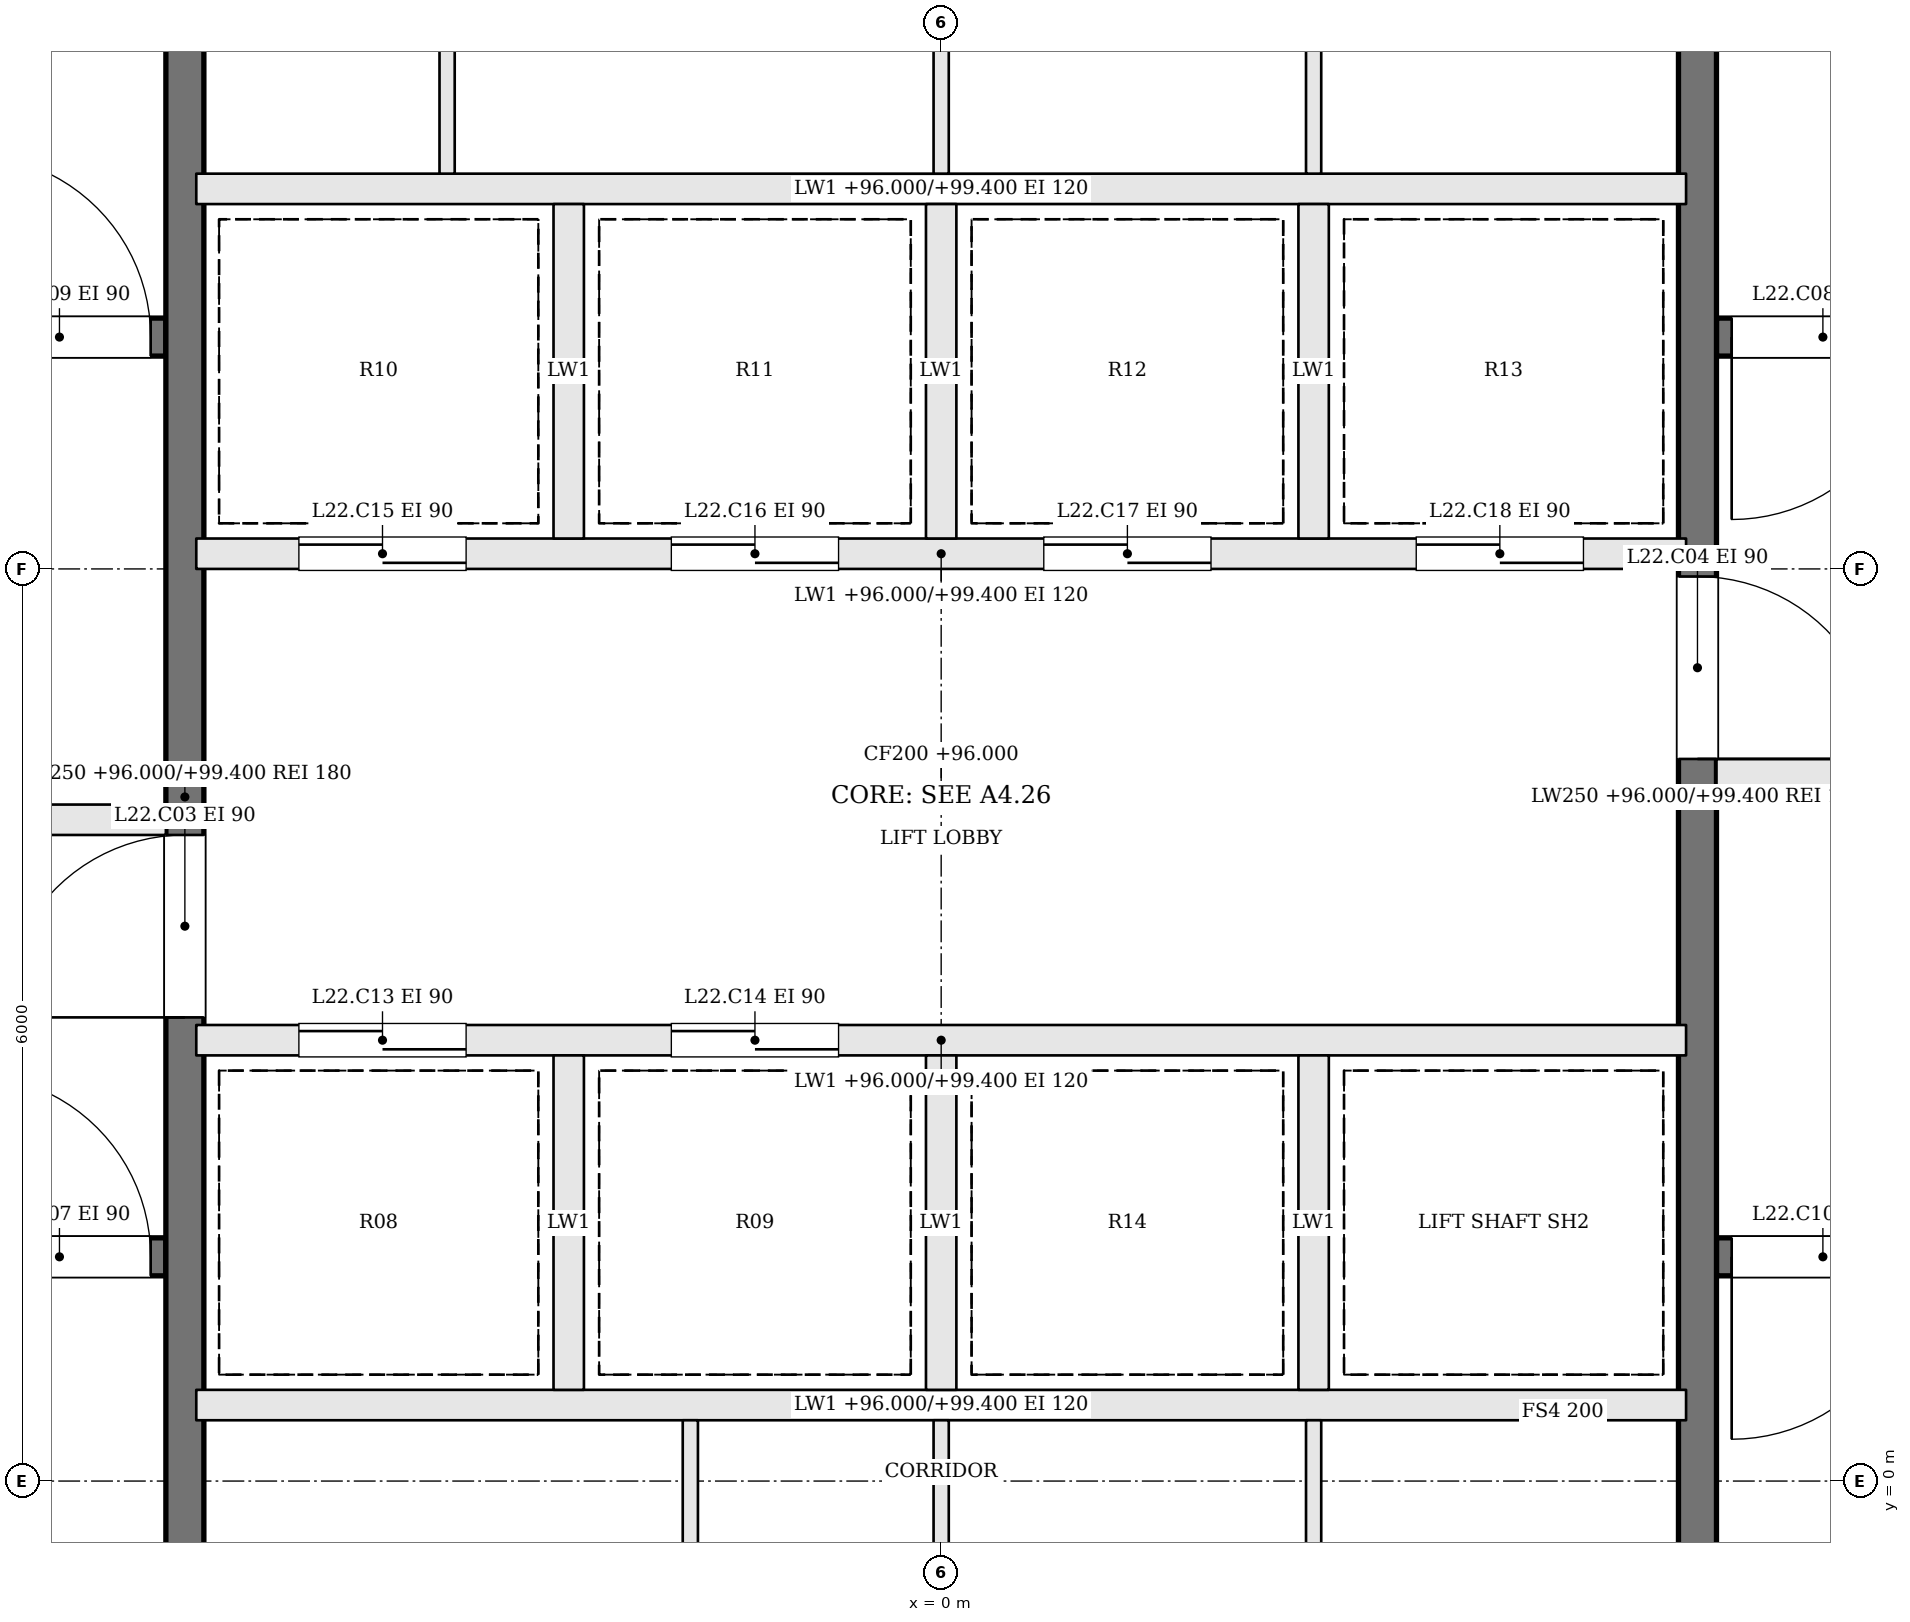
"""IFC4 building model, lengths in metres.
Left out: names, types, materials, properties, quantities, classifications, styles, units other than length and angle.
Written with IfcOpenShell. Run it as: python <this file> out.ifc"""

import sys

from ifc_helpers import new_model, si_unit, direction, frame, frame_2d, origin, place, context, subcontext, project, spatial, rectangle, extrude, element, fill, save


model = new_model("IFC4")
c1 = context("Model", 3, precision=1e-05, world=origin(), true_north=direction((0.0, 1.0)))
c2 = subcontext(c1, "Body", "Model", "MODEL_VIEW")
j1 = project(units=[si_unit("LENGTHUNIT", "METRE"), si_unit("PLANEANGLEUNIT", "RADIAN")], contexts=[c1])
p1 = place(None, origin())
s1 = spatial("IfcSite", under=j1, at=p1, CompositionType="ELEMENT")
p2 = place(p1, origin())
s2 = spatial("IfcBuilding", under=s1, at=p2, CompositionType="ELEMENT")
p3 = place(p2, frame((0.0, 0.0, 96.0)))
s3 = spatial("IfcBuildingStorey", under=s2, at=p3, CompositionType="ELEMENT", Elevation=96.0)
p4 = place(p3, frame((-11.9, 1.475, 0.0), z_axis=(0.0, 0.0, 1.0), x_axis=(1.0, 0.0, 0.0)))
e1 = element("IfcWall", 1, at=p4, inside=s3, PredefinedType="SOLIDWALL", context=c2, shape_type="SweptSolid", body=[
    extrude(rectangle(XDim=6.8, YDim=0.25, at=frame_2d((3.4, 0.0))), origin(), (0.0, 0.0, 1.0), 3.4),
])
p5 = place(p4, frame((5.5, 0.0, 0.0)))
e2 = element("IfcOpeningElement", 2, at=p5, cuts=e1, PredefinedType="OPENING", context=c2, shape_type="SweptSolid", body=[
    extrude(rectangle(XDim=1.2, YDim=2.1, at=frame_2d((0.6, 1.05))), frame((0.0, 0.135, 0.0), z_axis=(0.0, -1.0, 0.0), x_axis=(1.0, 0.0, 0.0)), (0.0, 0.0, 1.0), 0.27),
])
p6 = place(p3, frame((11.9, 7.525, 0.0), z_axis=(0.0, 0.0, 1.0), x_axis=(-1.0, 0.0, 0.0)))
e3 = element("IfcWall", 3, at=p6, inside=s3, PredefinedType="SOLIDWALL", context=c2, shape_type="SweptSolid", body=[
    extrude(rectangle(XDim=6.8, YDim=0.25, at=frame_2d((3.4, 0.0))), origin(), (0.0, 0.0, 1.0), 3.4),
])
p7 = place(p6, frame((5.5, 0.0, 0.0)))
e4 = element("IfcOpeningElement", 4, at=p7, cuts=e3, PredefinedType="OPENING", context=c2, shape_type="SweptSolid", body=[
    extrude(rectangle(XDim=1.2, YDim=2.1, at=frame_2d((0.6, 1.05))), frame((0.0, 0.135, 0.0), z_axis=(0.0, -1.0, 0.0), x_axis=(1.0, 0.0, 0.0)), (0.0, 0.0, 1.0), 0.27),
])
p8 = place(p3, frame((-11.9, 4.35, 0.0), z_axis=(0.0, 0.0, 1.0), x_axis=(1.0, 0.0, 0.0)))
e5 = element("IfcWall", 5, at=p8, inside=s3, PredefinedType="SOLIDWALL", context=c2, shape_type="SweptSolid", body=[
    extrude(rectangle(XDim=6.8, YDim=0.2, at=frame_2d((3.4, 0.0))), origin(), (0.0, 0.0, 1.0), 3.4),
])
p9 = place(p8, frame((4.1, 0.0, 0.0)))
e6 = element("IfcOpeningElement", 6, at=p9, cuts=e5, PredefinedType="OPENING", context=c2, shape_type="SweptSolid", body=[
    extrude(rectangle(XDim=1.2, YDim=2.1, at=frame_2d((0.6, 1.05))), frame((0.0, 0.11, 0.0), z_axis=(0.0, -1.0, 0.0), x_axis=(1.0, 0.0, 0.0)), (0.0, 0.0, 1.0), 0.22),
])
p10 = place(p8, frame((0.8, 0.0, 0.0)))
e7 = element("IfcOpeningElement", 7, at=p10, cuts=e5, PredefinedType="OPENING", context=c2, shape_type="SweptSolid", body=[
    extrude(rectangle(XDim=1.2, YDim=2.1, at=frame_2d((0.6, 1.05))), frame((0.0, 0.11, 0.0), z_axis=(0.0, -1.0, 0.0), x_axis=(1.0, 0.0, 0.0)), (0.0, 0.0, 1.0), 0.22),
])
p11 = place(p3, frame((11.9, 4.65, 0.0), z_axis=(0.0, 0.0, 1.0), x_axis=(-1.0, 0.0, 0.0)))
e8 = element("IfcWall", 8, at=p11, inside=s3, PredefinedType="SOLIDWALL", context=c2, shape_type="SweptSolid", body=[
    extrude(rectangle(XDim=6.8, YDim=0.2, at=frame_2d((3.4, 0.0))), origin(), (0.0, 0.0, 1.0), 3.4),
])
p12 = place(p11, frame((4.1, 0.0, 0.0)))
e9 = element("IfcOpeningElement", 9, at=p12, cuts=e8, PredefinedType="OPENING", context=c2, shape_type="SweptSolid", body=[
    extrude(rectangle(XDim=1.2, YDim=2.1, at=frame_2d((0.6, 1.05))), frame((0.0, 0.11, 0.0), z_axis=(0.0, -1.0, 0.0), x_axis=(1.0, 0.0, 0.0)), (0.0, 0.0, 1.0), 0.22),
])
p13 = place(p11, frame((0.8, 0.0, 0.0)))
e10 = element("IfcOpeningElement", 10, at=p13, cuts=e8, PredefinedType="OPENING", context=c2, shape_type="SweptSolid", body=[
    extrude(rectangle(XDim=1.2, YDim=2.1, at=frame_2d((0.6, 1.05))), frame((0.0, 0.11, 0.0), z_axis=(0.0, -1.0, 0.0), x_axis=(1.0, 0.0, 0.0)), (0.0, 0.0, 1.0), 0.22),
])
p14 = place(p3, frame((-11.9, 7.525, 0.0), z_axis=(0.0, 0.0, 1.0), x_axis=(1.0, 0.0, 0.0)))
e11 = element("IfcWall", 11, at=p14, inside=s3, PredefinedType="SOLIDWALL", context=c2, shape_type="SweptSolid", body=[
    extrude(rectangle(XDim=6.8, YDim=0.25, at=frame_2d((3.4, 0.0))), origin(), (0.0, 0.0, 1.0), 3.4),
])
p15 = place(p14, frame((5.5, 0.0, 0.0)))
e12 = element("IfcOpeningElement", 12, at=p15, cuts=e11, PredefinedType="OPENING", context=c2, shape_type="SweptSolid", body=[
    extrude(rectangle(XDim=1.2, YDim=2.1, at=frame_2d((0.6, 1.05))), frame((0.0, 0.135, 0.0), z_axis=(0.0, -1.0, 0.0), x_axis=(1.0, 0.0, 0.0)), (0.0, 0.0, 1.0), 0.27),
])
p16 = place(p3, frame((11.9, 1.475, 0.0), z_axis=(0.0, 0.0, 1.0), x_axis=(-1.0, 0.0, 0.0)))
e13 = element("IfcWall", 13, at=p16, inside=s3, PredefinedType="SOLIDWALL", context=c2, shape_type="SweptSolid", body=[
    extrude(rectangle(XDim=6.8, YDim=0.25, at=frame_2d((3.4, 0.0))), origin(), (0.0, 0.0, 1.0), 3.4),
])
p17 = place(p16, frame((5.5, 0.0, 0.0)))
e14 = element("IfcOpeningElement", 14, at=p17, cuts=e13, PredefinedType="OPENING", context=c2, shape_type="SweptSolid", body=[
    extrude(rectangle(XDim=1.2, YDim=2.1, at=frame_2d((0.6, 1.05))), frame((0.0, 0.135, 0.0), z_axis=(0.0, -1.0, 0.0), x_axis=(1.0, 0.0, 0.0)), (0.0, 0.0, 1.0), 0.27),
])
p18 = place(p3, frame((-4.975, -1.9, 0.0), z_axis=(0.0, 0.0, 1.0), x_axis=(0.0, 1.0, 0.0)))
e15 = element("IfcWall", 15, at=p18, inside=s3, PredefinedType="SOLIDWALL", context=c2, shape_type="SweptSolid", body=[
    extrude(rectangle(XDim=12.8, YDim=0.25, at=frame_2d((6.4, 0.0))), origin(), (0.0, 0.0, 1.0), 3.4),
])
p19 = place(p18, frame((4.95, 0.0, 0.0)))
e16 = element("IfcOpeningElement", 16, at=p19, cuts=e15, PredefinedType="OPENING", context=c2, shape_type="SweptSolid", body=[
    extrude(rectangle(XDim=1.2, YDim=2.1, at=frame_2d((0.6, 1.05))), frame((0.0, 0.135, 0.0), z_axis=(0.0, -1.0, 0.0), x_axis=(1.0, 0.0, 0.0)), (0.0, 0.0, 1.0), 0.27),
])
p20 = place(p3, frame((4.975, 10.9, 0.0), z_axis=(0.0, 0.0, 1.0), x_axis=(0.0, -1.0, 0.0)))
e17 = element("IfcWall", 17, at=p20, inside=s3, PredefinedType="SOLIDWALL", context=c2, shape_type="SweptSolid", body=[
    extrude(rectangle(XDim=12.8, YDim=0.25, at=frame_2d((6.4, 0.0))), origin(), (0.0, 0.0, 1.0), 3.4),
])
p21 = place(p20, frame((4.95, 0.0, 0.0)))
e18 = element("IfcOpeningElement", 18, at=p21, cuts=e17, PredefinedType="OPENING", context=c2, shape_type="SweptSolid", body=[
    extrude(rectangle(XDim=1.2, YDim=2.1, at=frame_2d((0.6, 1.05))), frame((0.0, 0.135, 0.0), z_axis=(0.0, -1.0, 0.0), x_axis=(1.0, 0.0, 0.0)), (0.0, 0.0, 1.0), 0.27),
])
p22 = place(p3, frame((-4.9, 0.5, 0.0), z_axis=(0.0, 0.0, 1.0), x_axis=(1.0, 0.0, 0.0)))
e19 = element("IfcWall", 19, at=p22, inside=s3, PredefinedType="SOLIDWALL", context=c2, shape_type="SweptSolid", body=[
    extrude(rectangle(XDim=9.8, YDim=0.2, at=frame_2d((4.9, 0.0))), origin(), (0.0, 0.0, 1.0), 3.4),
])
p23 = place(p3, frame((-4.9, 2.9, 0.0), z_axis=(0.0, 0.0, 1.0), x_axis=(1.0, 0.0, 0.0)))
e20 = element("IfcWall", 20, at=p23, inside=s3, PredefinedType="SOLIDWALL", context=c2, shape_type="SweptSolid", body=[
    extrude(rectangle(XDim=9.8, YDim=0.2, at=frame_2d((4.9, 0.0))), origin(), (0.0, 0.0, 1.0), 3.4),
])
p24 = place(p23, frame((0.675, 0.0, 0.0)))
e21 = element("IfcOpeningElement", 21, at=p24, cuts=e20, PredefinedType="OPENING", context=c2, shape_type="SweptSolid", body=[
    extrude(rectangle(XDim=1.1, YDim=2.1, at=frame_2d((0.55, 1.05))), frame((0.0, 0.11, 0.0), z_axis=(0.0, -1.0, 0.0), x_axis=(1.0, 0.0, 0.0)), (0.0, 0.0, 1.0), 0.22),
])
p25 = place(p23, frame((3.125, 0.0, 0.0)))
e22 = element("IfcOpeningElement", 22, at=p25, cuts=e20, PredefinedType="OPENING", context=c2, shape_type="SweptSolid", body=[
    extrude(rectangle(XDim=1.1, YDim=2.1, at=frame_2d((0.55, 1.05))), frame((0.0, 0.11, 0.0), z_axis=(0.0, -1.0, 0.0), x_axis=(1.0, 0.0, 0.0)), (0.0, 0.0, 1.0), 0.22),
])
p26 = place(p3, frame((-4.9, 6.1, 0.0), z_axis=(0.0, 0.0, 1.0), x_axis=(1.0, 0.0, 0.0)))
e23 = element("IfcWall", 23, at=p26, inside=s3, PredefinedType="SOLIDWALL", context=c2, shape_type="SweptSolid", body=[
    extrude(rectangle(XDim=9.8, YDim=0.2, at=frame_2d((4.9, 0.0))), origin(), (0.0, 0.0, 1.0), 3.4),
])
p27 = place(p26, frame((0.675, 0.0, 0.0)))
e24 = element("IfcOpeningElement", 24, at=p27, cuts=e23, PredefinedType="OPENING", context=c2, shape_type="SweptSolid", body=[
    extrude(rectangle(XDim=1.1, YDim=2.1, at=frame_2d((0.55, 1.05))), frame((0.0, 0.11, 0.0), z_axis=(0.0, -1.0, 0.0), x_axis=(1.0, 0.0, 0.0)), (0.0, 0.0, 1.0), 0.22),
])
p28 = place(p26, frame((3.125, 0.0, 0.0)))
e25 = element("IfcOpeningElement", 25, at=p28, cuts=e23, PredefinedType="OPENING", context=c2, shape_type="SweptSolid", body=[
    extrude(rectangle(XDim=1.1, YDim=2.1, at=frame_2d((0.55, 1.05))), frame((0.0, 0.11, 0.0), z_axis=(0.0, -1.0, 0.0), x_axis=(1.0, 0.0, 0.0)), (0.0, 0.0, 1.0), 0.22),
])
p29 = place(p26, frame((5.575, 0.0, 0.0)))
e26 = element("IfcOpeningElement", 26, at=p29, cuts=e23, PredefinedType="OPENING", context=c2, shape_type="SweptSolid", body=[
    extrude(rectangle(XDim=1.1, YDim=2.1, at=frame_2d((0.55, 1.05))), frame((0.0, 0.11, 0.0), z_axis=(0.0, -1.0, 0.0), x_axis=(1.0, 0.0, 0.0)), (0.0, 0.0, 1.0), 0.22),
])
p30 = place(p26, frame((8.025, 0.0, 0.0)))
e27 = element("IfcOpeningElement", 27, at=p30, cuts=e23, PredefinedType="OPENING", context=c2, shape_type="SweptSolid", body=[
    extrude(rectangle(XDim=1.1, YDim=2.1, at=frame_2d((0.55, 1.05))), frame((0.0, 0.11, 0.0), z_axis=(0.0, -1.0, 0.0), x_axis=(1.0, 0.0, 0.0)), (0.0, 0.0, 1.0), 0.22),
])
p31 = place(p3, frame((-4.9, 8.5, 0.0), z_axis=(0.0, 0.0, 1.0), x_axis=(1.0, 0.0, 0.0)))
e28 = element("IfcWall", 28, at=p31, inside=s3, PredefinedType="SOLIDWALL", context=c2, shape_type="SweptSolid", body=[
    extrude(rectangle(XDim=9.8, YDim=0.2, at=frame_2d((4.9, 0.0))), origin(), (0.0, 0.0, 1.0), 3.4),
])
for number, where, z_axis, x_axis in (
    (29, (-2.45, 0.6, 0.0), (0.0, 0.0, 1.0), (0.0, 1.0, 0.0)),
    (30, (0.0, 0.6, 0.0), (0.0, 0.0, 1.0), (0.0, 1.0, 0.0)),
    (31, (2.45, 0.6, 0.0), (0.0, 0.0, 1.0), (0.0, 1.0, 0.0)),
    (32, (-2.45, 6.2, 0.0), (0.0, 0.0, 1.0), (0.0, 1.0, 0.0)),
    (33, (0.0, 6.2, 0.0), (0.0, 0.0, 1.0), (0.0, 1.0, 0.0)),
    (34, (2.45, 6.2, 0.0), (0.0, 0.0, 1.0), (0.0, 1.0, 0.0)),
):
    element("IfcWall", number, at=place(p3, frame(where, z_axis=z_axis, x_axis=x_axis)), inside=s3, PredefinedType="SOLIDWALL", context=c2, shape_type="SweptSolid", body=[
        extrude(rectangle(XDim=2.2, YDim=0.2, at=frame_2d((1.1, 0.0))), origin(), (0.0, 0.0, 1.0), 3.4),
    ])
for number, where, z_axis, x_axis in (
    (35, (-1.65, -1.9, 0.0), (0.0, 0.0, 1.0), (0.0, 1.0, 0.0)),
    (36, (0.0, -1.9, 0.0), (0.0, 0.0, 1.0), (0.0, 1.0, 0.0)),
    (37, (2.45, -1.9, 0.0), (0.0, 0.0, 1.0), (0.0, 1.0, 0.0)),
    (38, (-3.25, 8.6, 0.0), (0.0, 0.0, 1.0), (0.0, 1.0, 0.0)),
    (39, (0.0, 8.6, 0.0), (0.0, 0.0, 1.0), (0.0, 1.0, 0.0)),
    (40, (2.45, 8.6, 0.0), (0.0, 0.0, 1.0), (0.0, 1.0, 0.0)),
):
    element("IfcWall", number, at=place(p3, frame(where, z_axis=z_axis, x_axis=x_axis)), inside=s3, PredefinedType="PARTITIONING", context=c2, shape_type="SweptSolid", body=[
        extrude(rectangle(XDim=2.3, YDim=0.1, at=frame_2d((1.15, 0.0))), origin(), (0.0, 0.0, 1.0), 3.4),
    ])
p32 = place(p19, origin())
e41 = element("IfcDoor", 41, at=p32, inside=s3, OperationType="SINGLE_SWING_LEFT", PredefinedType="DOOR", context=c2, shape_type="SweptSolid", body=[
    extrude(rectangle(XDim=1.2, YDim=2.1, at=frame_2d((0.6, 1.05))), frame((0.0, 0.025, 0.0), z_axis=(0.0, -1.0, 0.0), x_axis=(1.0, 0.0, 0.0)), (0.0, 0.0, 1.0), 0.05),
])
fill(e16, e41)
p33 = place(p21, origin())
e42 = element("IfcDoor", 42, at=p33, inside=s3, OperationType="SINGLE_SWING_RIGHT", PredefinedType="DOOR", context=c2, shape_type="SweptSolid", body=[
    extrude(rectangle(XDim=1.2, YDim=2.1, at=frame_2d((0.6, 1.05))), frame((0.0, 0.025, 0.0), z_axis=(0.0, -1.0, 0.0), x_axis=(1.0, 0.0, 0.0)), (0.0, 0.0, 1.0), 0.05),
])
fill(e18, e42)
p34 = place(p5, origin())
e43 = element("IfcDoor", 43, at=p34, inside=s3, OperationType="SINGLE_SWING_LEFT", PredefinedType="DOOR", context=c2, shape_type="SweptSolid", body=[
    extrude(rectangle(XDim=1.2, YDim=2.1, at=frame_2d((0.6, 1.05))), frame((0.0, 0.025, 0.0), z_axis=(0.0, -1.0, 0.0), x_axis=(1.0, 0.0, 0.0)), (0.0, 0.0, 1.0), 0.05),
])
fill(e2, e43)
p35 = place(p7, origin())
e44 = element("IfcDoor", 44, at=p35, inside=s3, OperationType="SINGLE_SWING_RIGHT", PredefinedType="DOOR", context=c2, shape_type="SweptSolid", body=[
    extrude(rectangle(XDim=1.2, YDim=2.1, at=frame_2d((0.6, 1.05))), frame((0.0, 0.025, 0.0), z_axis=(0.0, -1.0, 0.0), x_axis=(1.0, 0.0, 0.0)), (0.0, 0.0, 1.0), 0.05),
])
fill(e4, e44)
p36 = place(p15, origin())
e45 = element("IfcDoor", 45, at=p36, inside=s3, OperationType="SINGLE_SWING_LEFT", PredefinedType="DOOR", context=c2, shape_type="SweptSolid", body=[
    extrude(rectangle(XDim=1.2, YDim=2.1, at=frame_2d((0.6, 1.05))), frame((0.0, 0.025, 0.0), z_axis=(0.0, -1.0, 0.0), x_axis=(1.0, 0.0, 0.0)), (0.0, 0.0, 1.0), 0.05),
])
fill(e12, e45)
p37 = place(p17, origin())
e46 = element("IfcDoor", 46, at=p37, inside=s3, OperationType="SINGLE_SWING_RIGHT", PredefinedType="DOOR", context=c2, shape_type="SweptSolid", body=[
    extrude(rectangle(XDim=1.2, YDim=2.1, at=frame_2d((0.6, 1.05))), frame((0.0, 0.025, 0.0), z_axis=(0.0, -1.0, 0.0), x_axis=(1.0, 0.0, 0.0)), (0.0, 0.0, 1.0), 0.05),
])
fill(e14, e46)
p38 = place(p24, origin())
e47 = element("IfcDoor", 47, at=p38, inside=s3, OperationType="SLIDING_TO_RIGHT", PredefinedType="DOOR", context=c2, shape_type="SweptSolid", body=[
    extrude(rectangle(XDim=1.1, YDim=2.1, at=frame_2d((0.55, 1.05))), frame((0.0, 0.025, 0.0), z_axis=(0.0, -1.0, 0.0), x_axis=(1.0, 0.0, 0.0)), (0.0, 0.0, 1.0), 0.05),
])
fill(e21, e47)
p39 = place(p25, origin())
e48 = element("IfcDoor", 48, at=p39, inside=s3, OperationType="SLIDING_TO_LEFT", PredefinedType="DOOR", context=c2, shape_type="SweptSolid", body=[
    extrude(rectangle(XDim=1.1, YDim=2.1, at=frame_2d((0.55, 1.05))), frame((0.0, 0.025, 0.0), z_axis=(0.0, -1.0, 0.0), x_axis=(1.0, 0.0, 0.0)), (0.0, 0.0, 1.0), 0.05),
])
fill(e22, e48)
p40 = place(p27, origin())
e49 = element("IfcDoor", 49, at=p40, inside=s3, OperationType="SLIDING_TO_RIGHT", PredefinedType="DOOR", context=c2, shape_type="SweptSolid", body=[
    extrude(rectangle(XDim=1.1, YDim=2.1, at=frame_2d((0.55, 1.05))), frame((0.0, 0.025, 0.0), z_axis=(0.0, -1.0, 0.0), x_axis=(1.0, 0.0, 0.0)), (0.0, 0.0, 1.0), 0.05),
])
fill(e24, e49)
p41 = place(p28, origin())
e50 = element("IfcDoor", 50, at=p41, inside=s3, OperationType="SLIDING_TO_LEFT", PredefinedType="DOOR", context=c2, shape_type="SweptSolid", body=[
    extrude(rectangle(XDim=1.1, YDim=2.1, at=frame_2d((0.55, 1.05))), frame((0.0, 0.025, 0.0), z_axis=(0.0, -1.0, 0.0), x_axis=(1.0, 0.0, 0.0)), (0.0, 0.0, 1.0), 0.05),
])
fill(e25, e50)
p42 = place(p29, origin())
e51 = element("IfcDoor", 51, at=p42, inside=s3, OperationType="SLIDING_TO_RIGHT", PredefinedType="DOOR", context=c2, shape_type="SweptSolid", body=[
    extrude(rectangle(XDim=1.1, YDim=2.1, at=frame_2d((0.55, 1.05))), frame((0.0, 0.025, 0.0), z_axis=(0.0, -1.0, 0.0), x_axis=(1.0, 0.0, 0.0)), (0.0, 0.0, 1.0), 0.05),
])
fill(e26, e51)
p43 = place(p30, origin())
e52 = element("IfcDoor", 52, at=p43, inside=s3, OperationType="SLIDING_TO_LEFT", PredefinedType="DOOR", context=c2, shape_type="SweptSolid", body=[
    extrude(rectangle(XDim=1.1, YDim=2.1, at=frame_2d((0.55, 1.05))), frame((0.0, 0.025, 0.0), z_axis=(0.0, -1.0, 0.0), x_axis=(1.0, 0.0, 0.0)), (0.0, 0.0, 1.0), 0.05),
])
fill(e27, e52)
save(model, sys.argv[1])
